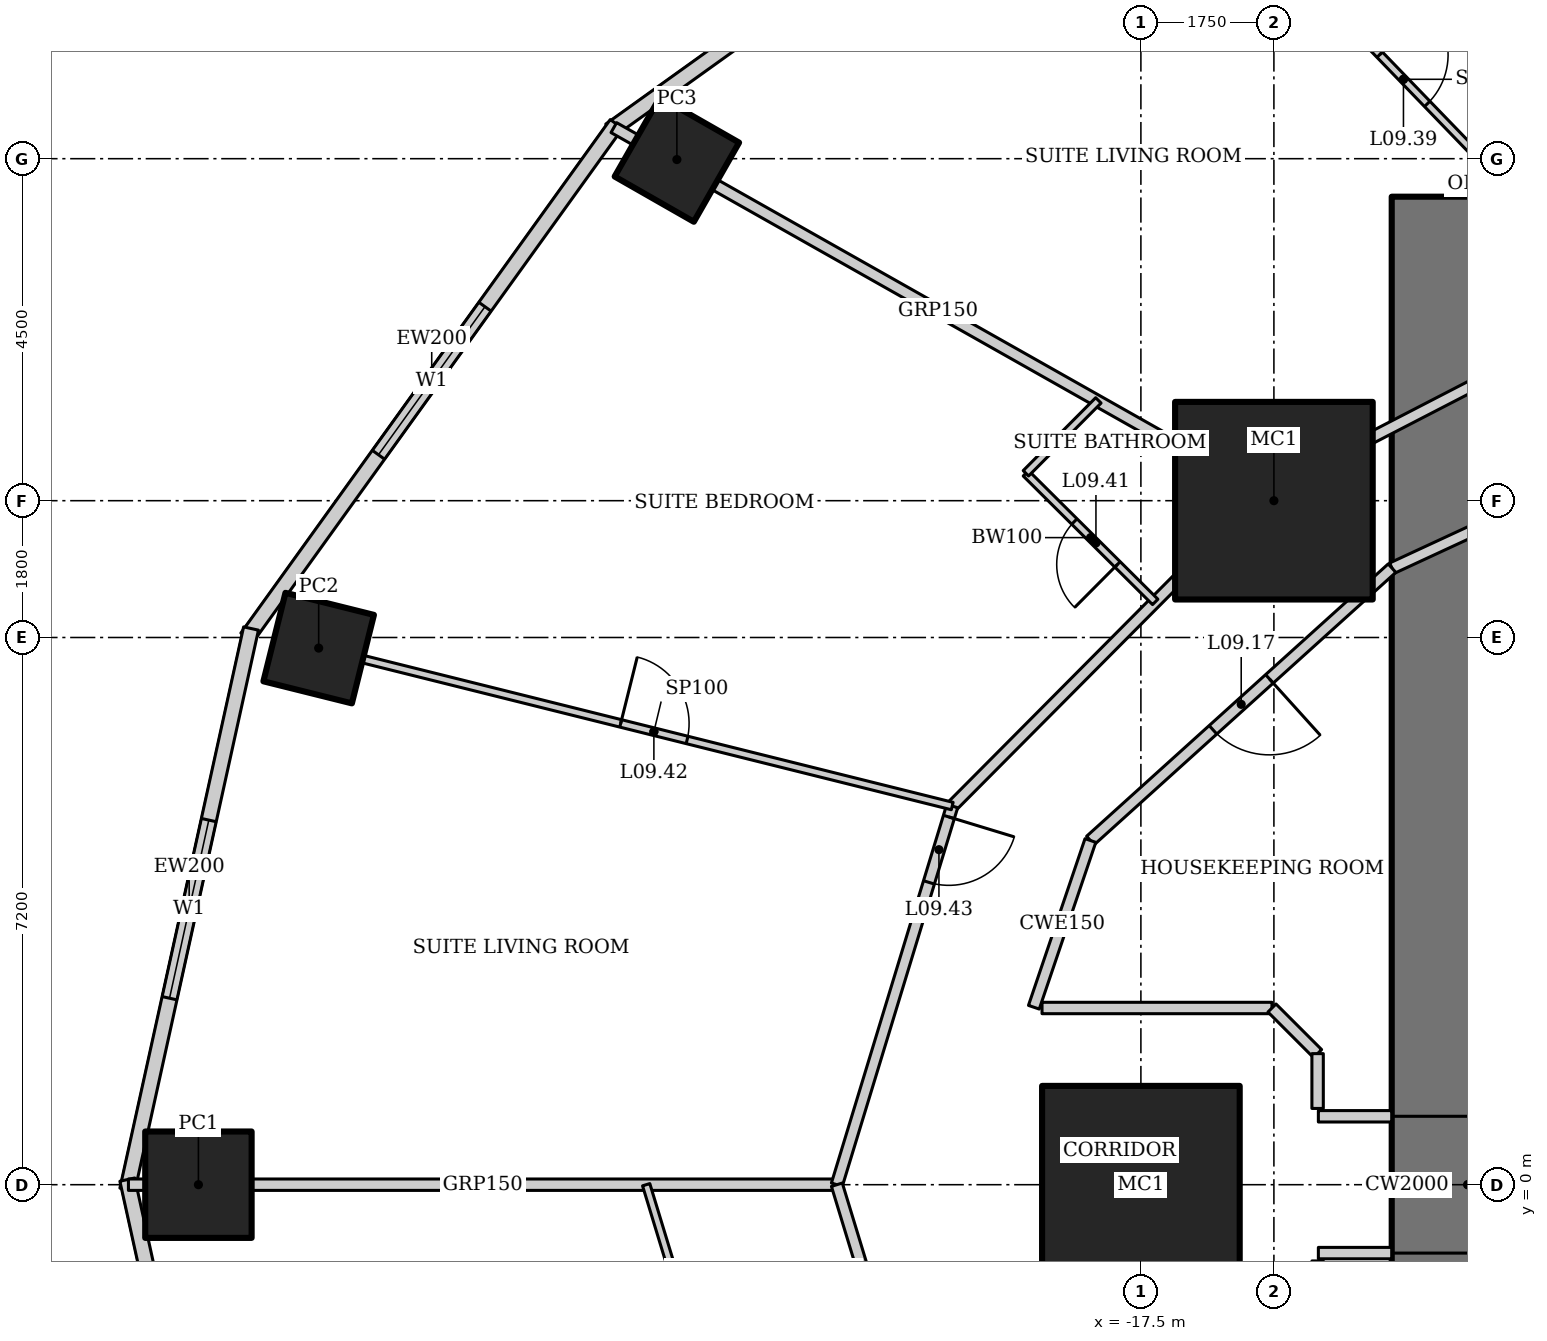
"""IFC4 building model, lengths in metres.
Left out: names, types, materials, properties, quantities, classifications, styles, units other than length and angle.
Written with IfcOpenShell. Run it as: python <this file> out.ifc"""

import sys

from ifc_helpers import new_model, si_unit, direction, frame, frame_2d, origin, origin_2d, place, context, subcontext, project, spatial, rectangle, hollow_rectangle, extrude, element, fill, save


model = new_model("IFC4")
c1 = context("Model", 3, precision=1e-05, world=origin(), true_north=direction((0.0, 1.0)))
c2 = subcontext(c1, "Body", "Model", "MODEL_VIEW")
j1 = project(units=[si_unit("LENGTHUNIT", "METRE"), si_unit("PLANEANGLEUNIT", "RADIAN")], contexts=[c1])
p1 = place(None, origin())
s1 = spatial("IfcSite", under=j1, at=p1, CompositionType="ELEMENT")
p2 = place(p1, origin())
s2 = spatial("IfcBuilding", under=s1, at=p2, CompositionType="ELEMENT")
p3 = place(p2, frame((0.0, 0.0, 47.8)))
s3 = spatial("IfcBuildingStorey", under=s2, at=p3, CompositionType="ELEMENT", Elevation=47.8)
for number, where, z_axis, x_axis in (
    (1, (-15.75, 9.0, 0.0), (0.0, 0.0, 1.0), (1.0, 0.0, 0.0)),
    (2, (-17.5, 0.0, 0.0), (0.0, 0.0, 1.0), (1.0, 0.0, 0.0)),
):
    element("IfcColumn", number, at=place(p3, frame(where, z_axis=z_axis, x_axis=x_axis)), inside=s3, PredefinedType="COLUMN", context=c2, shape_type="SweptSolid", body=[
        extrude(hollow_rectangle(XDim=2.6, YDim=2.6, WallThickness=0.13, at=origin_2d()), origin(), (0.0, 0.0, 1.0), 3.6),
    ])
p4 = place(p3, frame((-23.605, 13.489, 0.0), z_axis=(0.0, 0.0, 1.0), x_axis=(0.496139221777, 0.86824298017, 0.0)))
e3 = element("IfcColumn", 3, at=p4, inside=s3, PredefinedType="COLUMN", context=c2, shape_type="SweptSolid", body=[
    extrude(hollow_rectangle(XDim=1.2, YDim=1.2, WallThickness=0.12, at=origin_2d()), origin(), (0.0, 0.0, 1.0), 3.6),
])
p5 = place(p3, frame((-28.318, 7.06, 0.0), z_axis=(0.0, 0.0, 1.0), x_axis=(0.2419218956, 0.970295726276, 0.0)))
e4 = element("IfcColumn", 4, at=p5, inside=s3, PredefinedType="COLUMN", context=c2, shape_type="SweptSolid", body=[
    extrude(hollow_rectangle(XDim=1.2, YDim=1.2, WallThickness=0.1, at=origin_2d()), origin(), (0.0, 0.0, 1.0), 3.6),
])
p6 = place(p3, frame((-29.9, 0.0, 0.0), z_axis=(0.0, 0.0, 1.0), x_axis=(1.0, 0.0, 0.0)))
e5 = element("IfcColumn", 5, at=p6, inside=s3, PredefinedType="COLUMN", context=c2, shape_type="SweptSolid", body=[
    extrude(hollow_rectangle(XDim=1.4, YDim=1.4, WallThickness=0.1, at=origin_2d()), origin(), (0.0, 0.0, 1.0), 3.6),
])
p7 = place(p3, frame((-13.2, 13.0, 0.0), z_axis=(0.0, 0.0, 1.0), x_axis=(0.0, -1.0, 0.0)))
e6 = element("IfcWall", 6, at=p7, inside=s3, PredefinedType="SHEAR", context=c2, shape_type="SweptSolid", body=[
    extrude(rectangle(XDim=26.0, YDim=2.0, at=frame_2d((13.0, 0.0))), origin(), (0.0, 0.0, 1.0), 3.6),
])
p8 = place(p7, frame((12.1, 0.0, 0.0)))
e7 = element("IfcOpeningElement", 7, at=p8, cuts=e6, PredefinedType="OPENING", context=c2, shape_type="SweptSolid", body=[
    extrude(rectangle(XDim=1.8, YDim=2.1, at=frame_2d((0.9, 1.05))), frame((0.0, 1.01, 0.0), z_axis=(0.0, -1.0, 0.0), x_axis=(1.0, 0.0, 0.0)), (0.0, 0.0, 1.0), 2.02),
])
p9 = place(p3, frame((-17.929, 18.572, 0.0), z_axis=(0.0, 0.0, 1.0), x_axis=(-0.812791321576, -0.582554948112, 0.0)))
e8 = element("IfcWall", 8, at=p9, inside=s3, PredefinedType="SOLIDWALL", context=c2, shape_type="SweptSolid", body=[
    extrude(rectangle(XDim=8.063, YDim=0.2, at=frame_2d((4.032, 0.0))), origin(), (0.0, 0.0, 1.0), 3.45),
])
p10 = place(p9, frame((2.832, 0.0, 0.5)))
e9 = element("IfcOpeningElement", 9, at=p10, cuts=e8, PredefinedType="OPENING", context=c2, shape_type="SweptSolid", body=[
    extrude(rectangle(XDim=2.4, YDim=2.2, at=frame_2d((1.2, 1.1))), frame((0.0, 0.11, 0.0), z_axis=(0.0, -1.0, 0.0), x_axis=(1.0, 0.0, 0.0)), (0.0, 0.0, 1.0), 0.22),
])
p11 = place(p3, frame((-24.4, 13.957, 0.0), z_axis=(0.0, 0.0, 1.0), x_axis=(-0.583937613703, -0.811798536155, 0.0)))
e10 = element("IfcWall", 10, at=p11, inside=s3, PredefinedType="SOLIDWALL", context=c2, shape_type="SweptSolid", body=[
    extrude(rectangle(XDim=8.323, YDim=0.2, at=frame_2d((4.162, 0.0))), origin(), (0.0, 0.0, 1.0), 3.45),
])
p12 = place(p11, frame((2.961, 0.0, 0.5)))
e11 = element("IfcOpeningElement", 11, at=p12, cuts=e10, PredefinedType="OPENING", context=c2, shape_type="SweptSolid", body=[
    extrude(rectangle(XDim=2.4, YDim=2.2, at=frame_2d((1.2, 1.1))), frame((0.0, 0.11, 0.0), z_axis=(0.0, -1.0, 0.0), x_axis=(1.0, 0.0, 0.0)), (0.0, 0.0, 1.0), 0.22),
])
p13 = place(p3, frame((-29.208, 7.318, 0.0), z_axis=(0.0, 0.0, 1.0), x_axis=(-0.215238065514, -0.976561608478, 0.0)))
e12 = element("IfcWall", 12, at=p13, inside=s3, PredefinedType="SOLIDWALL", context=c2, shape_type="SweptSolid", body=[
    extrude(rectangle(XDim=7.562, YDim=0.2, at=frame_2d((3.781, 0.0))), origin(), (0.0, 0.0, 1.0), 3.45),
])
p14 = place(p13, frame((2.581, 0.0, 0.5)))
e13 = element("IfcOpeningElement", 13, at=p14, cuts=e12, PredefinedType="OPENING", context=c2, shape_type="SweptSolid", body=[
    extrude(rectangle(XDim=2.4, YDim=2.2, at=frame_2d((1.2, 1.1))), frame((0.0, 0.11, 0.0), z_axis=(0.0, -1.0, 0.0), x_axis=(1.0, 0.0, 0.0)), (0.0, 0.0, 1.0), 0.22),
])
p15 = place(p3, frame((-30.835, 0.067, 0.0), z_axis=(0.0, 0.0, 1.0), x_axis=(0.215238065514, -0.976561608478, 0.0)))
e14 = element("IfcWall", 14, at=p15, inside=s3, PredefinedType="SOLIDWALL", context=c2, shape_type="SweptSolid", body=[
    extrude(rectangle(XDim=7.562, YDim=0.2, at=frame_2d((3.781, 0.0))), origin(), (0.0, 0.0, 1.0), 3.45),
])
p16 = place(p15, frame((2.581, 0.0, 0.5)))
e15 = element("IfcOpeningElement", 15, at=p16, cuts=e14, PredefinedType="OPENING", context=c2, shape_type="SweptSolid", body=[
    extrude(rectangle(XDim=2.4, YDim=2.2, at=frame_2d((1.2, 1.1))), frame((0.0, 0.11, 0.0), z_axis=(0.0, -1.0, 0.0), x_axis=(1.0, 0.0, 0.0)), (0.0, 0.0, 1.0), 0.22),
])
p17 = place(p3, frame((-24.435, 13.909, 0.0), z_axis=(0.0, 0.0, 1.0), x_axis=(0.870612006791, -0.491970256856, 0.0)))
e16 = element("IfcWall", 16, at=p17, inside=s3, PredefinedType="PARTITIONING", context=c2, shape_type="SweptSolid", body=[
    extrude(rectangle(XDim=9.802, YDim=0.15, at=frame_2d((4.901, 0.0))), origin(), (0.0, 0.0, 1.0), 2.693),
])
p18 = place(p3, frame((-30.821, 0.0, 0.0), z_axis=(0.0, 0.0, 1.0), x_axis=(1.0, 0.0, 0.0)))
e17 = element("IfcWall", 17, at=p18, inside=s3, PredefinedType="PARTITIONING", context=c2, shape_type="SweptSolid", body=[
    extrude(rectangle(XDim=9.321, YDim=0.15, at=frame_2d((4.66, 0.0))), origin(), (0.0, 0.0, 1.0), 2.528),
])
p19 = place(p3, frame((-11.147, 11.544, 0.0), z_axis=(0.0, 0.0, 1.0), x_axis=(-0.888333171507, -0.459199495209, 0.0)))
e18 = element("IfcWall", 18, at=p19, inside=s3, PredefinedType="PARTITIONING", context=c2, shape_type="SweptSolid", body=[
    extrude(rectangle(XDim=5.351, YDim=0.15, at=frame_2d((2.676, 0.0))), origin(), (0.0, 0.0, 1.0), 3.45),
])
p20 = place(p19, frame((0.15, 0.0, 0.0)))
e19 = element("IfcOpeningElement", 19, at=p20, cuts=e18, PredefinedType="OPENING", context=c2, shape_type="SweptSolid", body=[
    extrude(rectangle(XDim=0.9, YDim=2.1, at=frame_2d((0.45, 1.05))), frame((0.0, 0.085, 0.0), z_axis=(0.0, -1.0, 0.0), x_axis=(1.0, 0.0, 0.0)), (0.0, 0.0, 1.0), 0.17),
])
p21 = place(p3, frame((-15.901, 9.086, 0.0), z_axis=(0.0, 0.0, 1.0), x_axis=(-0.705121546414, -0.709086457904, 0.0)))
e20 = element("IfcWall", 20, at=p21, inside=s3, PredefinedType="PARTITIONING", context=c2, shape_type="SweptSolid", body=[
    extrude(rectangle(XDim=5.788, YDim=0.15, at=frame_2d((2.894, 0.0))), origin(), (0.0, 0.0, 1.0), 3.45),
])
p22 = place(p3, frame((-19.982, 4.982, 0.0), z_axis=(0.0, 0.0, 1.0), x_axis=(-0.291383581394, -0.95660629754, 0.0)))
e21 = element("IfcWall", 21, at=p22, inside=s3, PredefinedType="PARTITIONING", context=c2, shape_type="SweptSolid", body=[
    extrude(rectangle(XDim=5.208, YDim=0.15, at=frame_2d((2.604, 0.0))), origin(), (0.0, 0.0, 1.0), 3.45),
])
p23 = place(p22, frame((0.15, 0.0, 0.0)))
e22 = element("IfcOpeningElement", 22, at=p23, cuts=e21, PredefinedType="OPENING", context=c2, shape_type="SweptSolid", body=[
    extrude(rectangle(XDim=0.9, YDim=2.1, at=frame_2d((0.45, 1.05))), frame((0.0, 0.085, 0.0), z_axis=(0.0, -1.0, 0.0), x_axis=(1.0, 0.0, 0.0)), (0.0, 0.0, 1.0), 0.17),
])
p24 = place(p3, frame((-21.5, 0.0, 0.0), z_axis=(0.0, 0.0, 1.0), x_axis=(0.291383581394, -0.95660629754, 0.0)))
e23 = element("IfcWall", 23, at=p24, inside=s3, PredefinedType="PARTITIONING", context=c2, shape_type="SweptSolid", body=[
    extrude(rectangle(XDim=5.208, YDim=0.15, at=frame_2d((2.604, 0.0))), origin(), (0.0, 0.0, 1.0), 3.45),
])
p25 = place(p3, frame((-9.801, 10.149, 0.0), z_axis=(0.0, 0.0, 1.0), x_axis=(-0.907279653965, -0.420527798727, 0.0)))
e24 = element("IfcWall", 24, at=p25, inside=s3, PredefinedType="PARTITIONING", context=c2, shape_type="SweptSolid", body=[
    extrude(rectangle(XDim=4.844, YDim=0.15, at=frame_2d((2.422, 0.0))), origin(), (0.0, 0.0, 1.0), 3.45),
])
p26 = place(p3, frame((-14.196, 8.112, 0.0), z_axis=(0.0, 0.0, 1.0), x_axis=(-0.742194222, -0.670184852731, 0.0)))
e25 = element("IfcWall", 25, at=p26, inside=s3, PredefinedType="PARTITIONING", context=c2, shape_type="SweptSolid", body=[
    extrude(rectangle(XDim=5.347, YDim=0.15, at=frame_2d((2.673, 0.0))), origin(), (0.0, 0.0, 1.0), 3.45),
])
p27 = place(p26, frame((2.173, 0.0, 0.0)))
e26 = element("IfcOpeningElement", 26, at=p27, cuts=e25, PredefinedType="OPENING", context=c2, shape_type="SweptSolid", body=[
    extrude(rectangle(XDim=1.0, YDim=2.1, at=frame_2d((0.5, 1.05))), frame((0.0, 0.085, 0.0), z_axis=(0.0, -1.0, 0.0), x_axis=(1.0, 0.0, 0.0)), (0.0, 0.0, 1.0), 0.17),
])
p28 = place(p3, frame((-16.944, 17.545, 0.0), z_axis=(0.0, 0.0, 1.0), x_axis=(0.694680670522, -0.71931826475, 0.0)))
e27 = element("IfcWall", 27, at=p28, inside=s3, PredefinedType="PARTITIONING", context=c2, shape_type="SweptSolid", body=[
    extrude(rectangle(XDim=8.344, YDim=0.1, at=frame_2d((4.172, 0.0))), origin(), (0.0, 0.0, 1.0), 2.528),
])
p29 = place(p28, frame((3.722, 0.0, 0.0)))
e28 = element("IfcOpeningElement", 28, at=p29, cuts=e27, PredefinedType="OPENING", context=c2, shape_type="SweptSolid", body=[
    extrude(rectangle(XDim=0.9, YDim=2.1, at=frame_2d((0.45, 1.05))), frame((0.0, 0.06, 0.0), z_axis=(0.0, -1.0, 0.0), x_axis=(1.0, 0.0, 0.0)), (0.0, 0.0, 1.0), 0.12),
])
p30 = place(p3, frame((-17.311, 7.668, 0.0), z_axis=(0.0, 0.0, 1.0), x_axis=(-0.709138392716, 0.705069315724, 0.0)))
e29 = element("IfcWall", 29, at=p30, inside=s3, PredefinedType="PARTITIONING", context=c2, shape_type="SweptSolid", body=[
    extrude(rectangle(XDim=2.4, YDim=0.1, at=frame_2d((1.2, 0.0))), origin(), (0.0, 0.0, 1.0), 3.45),
])
p31 = place(p30, frame((0.7, 0.0, 0.0)))
e30 = element("IfcOpeningElement", 30, at=p31, cuts=e29, PredefinedType="OPENING", context=c2, shape_type="SweptSolid", body=[
    extrude(rectangle(XDim=0.8, YDim=2.1, at=frame_2d((0.4, 1.05))), frame((0.0, 0.06, 0.0), z_axis=(0.0, -1.0, 0.0), x_axis=(1.0, 0.0, 0.0)), (0.0, 0.0, 1.0), 0.12),
])
p32 = place(p3, frame((-19.013, 9.36, 0.0), z_axis=(0.0, 0.0, 1.0), x_axis=(0.7051187611, 0.709089227633, 0.0)))
e31 = element("IfcWall", 31, at=p32, inside=s3, PredefinedType="PARTITIONING", context=c2, shape_type="SweptSolid", body=[
    extrude(rectangle(XDim=1.353, YDim=0.1, at=frame_2d((0.676, 0.0))), origin(), (0.0, 0.0, 1.0), 3.45),
])
p33 = place(p3, frame((-27.833, 6.939, 0.0), z_axis=(0.0, 0.0, 1.0), x_axis=(0.97029673161, -0.24191786339, 0.0)))
e32 = element("IfcWall", 32, at=p33, inside=s3, PredefinedType="PARTITIONING", context=c2, shape_type="SweptSolid", body=[
    extrude(rectangle(XDim=8.091, YDim=0.1, at=frame_2d((4.045, 0.0))), origin(), (0.0, 0.0, 1.0), 2.332),
])
p34 = place(p33, frame((3.595, 0.0, 0.0)))
e33 = element("IfcOpeningElement", 33, at=p34, cuts=e32, PredefinedType="OPENING", context=c2, shape_type="SweptSolid", body=[
    extrude(rectangle(XDim=0.9, YDim=2.1, at=frame_2d((0.45, 1.05))), frame((0.0, 0.06, 0.0), z_axis=(0.0, -1.0, 0.0), x_axis=(1.0, 0.0, 0.0)), (0.0, 0.0, 1.0), 0.12),
])
p35 = place(p3, frame((-23.213, -2.613, 0.0), z_axis=(0.0, 0.0, 1.0), x_axis=(-0.291339473488, 0.956619731757, 0.0)))
e34 = element("IfcWall", 34, at=p35, inside=s3, PredefinedType="PARTITIONING", context=c2, shape_type="SweptSolid", body=[
    extrude(rectangle(XDim=2.731, YDim=0.1, at=frame_2d((1.365, 0.0))), origin(), (0.0, 0.0, 1.0), 3.45),
])
p36 = place(p3, frame((-13.2, 13.0, 0.0), z_axis=(0.0, 0.0, 1.0), x_axis=(0.719347134512, 0.69465077562, 0.0)))
e35 = element("IfcWall", 35, at=p36, inside=s3, PredefinedType="PARTITIONING", context=c2, shape_type="SweptSolid", body=[
    extrude(rectangle(XDim=0.465, YDim=0.1, at=frame_2d((0.232, 0.0))), origin(), (0.0, 0.0, 1.0), 3.45),
])
p37 = place(p3, frame((-18.164, 4.529, 0.0), z_axis=(0.0, 0.0, 1.0), x_axis=(-0.321124194945, -0.947037090837, 0.0)))
e36 = element("IfcWall", 36, at=p37, inside=s3, PredefinedType="PARTITIONING", context=c2, shape_type="SweptSolid", body=[
    extrude(rectangle(XDim=2.317, YDim=0.15, at=frame_2d((1.158, 0.0))), origin(), (0.0, 0.0, 1.0), 3.45),
])
for number, where, z_axis, x_axis in (
    (37, (-14.2, -0.9, 0.0), (0.0, 0.0, 1.0), (-1.0, 0.0, 0.0)),
    (38, (-14.2, 0.9, 0.0), (0.0, 0.0, 1.0), (-1.0, 0.0, 0.0)),
):
    element("IfcWall", number, at=place(p3, frame(where, z_axis=z_axis, x_axis=x_axis)), inside=s3, PredefinedType="PARTITIONING", context=c2, shape_type="SweptSolid", body=[
        extrude(rectangle(XDim=0.965, YDim=0.15, at=frame_2d((0.482, 0.0))), origin(), (0.0, 0.0, 1.0), 3.45),
    ])
p38 = place(p3, frame((-18.801, 2.325, 0.0), z_axis=(0.0, 0.0, 1.0), x_axis=(1.0, 0.0, 0.0)))
e39 = element("IfcWall", 39, at=p38, inside=s3, PredefinedType="PARTITIONING", context=c2, shape_type="SweptSolid", body=[
    extrude(rectangle(XDim=3.025, YDim=0.15, at=frame_2d((1.513, 0.0))), origin(), (0.0, 0.0, 1.0), 3.45),
])
p39 = place(p3, frame((-15.775, 2.325, 0.0), z_axis=(0.0, 0.0, 1.0), x_axis=(0.707106781187, -0.707106781187, 0.0)))
e40 = element("IfcWall", 40, at=p39, inside=s3, PredefinedType="PARTITIONING", context=c2, shape_type="SweptSolid", body=[
    extrude(rectangle(XDim=0.849, YDim=0.15, at=frame_2d((0.425, 0.0))), origin(), (0.0, 0.0, 1.0), 3.45),
])
p40 = place(p3, frame((-15.175, 1.725, 0.0), z_axis=(0.0, 0.0, 1.0), x_axis=(0.0, -1.0, 0.0)))
e41 = element("IfcWall", 41, at=p40, inside=s3, PredefinedType="PARTITIONING", context=c2, shape_type="SweptSolid", body=[
    extrude(rectangle(XDim=0.721, YDim=0.15, at=frame_2d((0.361, 0.0))), origin(), (0.0, 0.0, 1.0), 3.45),
])
p41 = place(p12, origin())
e42 = element("IfcWindow", 42, at=p41, inside=s3, PartitioningType="SINGLE_PANEL", PredefinedType="WINDOW", context=c2, shape_type="SweptSolid", body=[
    extrude(rectangle(XDim=2.4, YDim=2.2, at=frame_2d((1.2, 1.1))), frame((0.0, 0.03, 0.0), z_axis=(0.0, -1.0, 0.0), x_axis=(1.0, 0.0, 0.0)), (0.0, 0.0, 1.0), 0.06),
])
fill(e11, e42)
p42 = place(p14, origin())
e43 = element("IfcWindow", 43, at=p42, inside=s3, PartitioningType="SINGLE_PANEL", PredefinedType="WINDOW", context=c2, shape_type="SweptSolid", body=[
    extrude(rectangle(XDim=2.4, YDim=2.2, at=frame_2d((1.2, 1.1))), frame((0.0, 0.03, 0.0), z_axis=(0.0, -1.0, 0.0), x_axis=(1.0, 0.0, 0.0)), (0.0, 0.0, 1.0), 0.06),
])
fill(e13, e43)
p43 = place(p8, origin())
e44 = element("IfcDoor", 44, at=p43, inside=s3, OperationType="DOUBLE_DOOR_DOUBLE_SWING", PredefinedType="DOOR", context=c2, shape_type="SweptSolid", body=[
    extrude(rectangle(XDim=1.8, YDim=2.1, at=frame_2d((0.9, 1.05))), frame((0.0, 0.025, 0.0), z_axis=(0.0, -1.0, 0.0), x_axis=(1.0, 0.0, 0.0)), (0.0, 0.0, 1.0), 0.05),
])
fill(e7, e44)
p44 = place(p27, origin())
e45 = element("IfcDoor", 45, at=p44, inside=s3, OperationType="SINGLE_SWING_LEFT", PredefinedType="DOOR", context=c2, shape_type="SweptSolid", body=[
    extrude(rectangle(XDim=1.0, YDim=2.1, at=frame_2d((0.5, 1.05))), frame((0.0, 0.025, 0.0), z_axis=(0.0, -1.0, 0.0), x_axis=(1.0, 0.0, 0.0)), (0.0, 0.0, 1.0), 0.05),
])
fill(e26, e45)
p45 = place(p29, origin())
e46 = element("IfcDoor", 46, at=p45, inside=s3, OperationType="SINGLE_SWING_LEFT", PredefinedType="DOOR", context=c2, shape_type="SweptSolid", body=[
    extrude(rectangle(XDim=0.9, YDim=2.1, at=frame_2d((0.45, 1.05))), frame((0.0, 0.025, 0.0), z_axis=(0.0, -1.0, 0.0), x_axis=(1.0, 0.0, 0.0)), (0.0, 0.0, 1.0), 0.05),
])
fill(e28, e46)
p46 = place(p31, origin())
e47 = element("IfcDoor", 47, at=p46, inside=s3, OperationType="SINGLE_SWING_LEFT", PredefinedType="DOOR", context=c2, shape_type="SweptSolid", body=[
    extrude(rectangle(XDim=0.8, YDim=2.1, at=frame_2d((0.4, 1.05))), frame((0.0, 0.025, 0.0), z_axis=(0.0, -1.0, 0.0), x_axis=(1.0, 0.0, 0.0)), (0.0, 0.0, 1.0), 0.05),
])
fill(e30, e47)
p47 = place(p34, origin())
e48 = element("IfcDoor", 48, at=p47, inside=s3, OperationType="SINGLE_SWING_LEFT", PredefinedType="DOOR", context=c2, shape_type="SweptSolid", body=[
    extrude(rectangle(XDim=0.9, YDim=2.1, at=frame_2d((0.45, 1.05))), frame((0.0, 0.025, 0.0), z_axis=(0.0, -1.0, 0.0), x_axis=(1.0, 0.0, 0.0)), (0.0, 0.0, 1.0), 0.05),
])
fill(e33, e48)
p48 = place(p23, origin())
e49 = element("IfcDoor", 49, at=p48, inside=s3, OperationType="SINGLE_SWING_LEFT", PredefinedType="DOOR", context=c2, shape_type="SweptSolid", body=[
    extrude(rectangle(XDim=0.9, YDim=2.1, at=frame_2d((0.45, 1.05))), frame((0.0, 0.025, 0.0), z_axis=(0.0, -1.0, 0.0), x_axis=(1.0, 0.0, 0.0)), (0.0, 0.0, 1.0), 0.05),
])
fill(e22, e49)
save(model, sys.argv[1])
